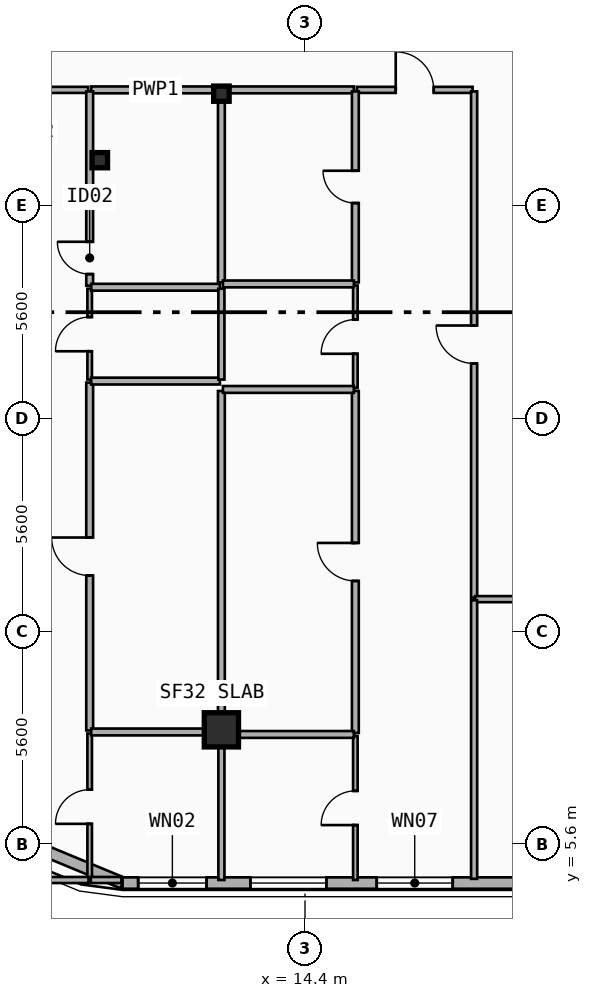
"""IFC4 building model, lengths in metres.
Left out: names, types, materials, properties, quantities, classifications, styles, units other than length and angle.
Written with IfcOpenShell. Run it as: python <this file> out.ifc"""

import sys

from ifc_helpers import new_model, si_unit, direction, frame, frame_2d, origin, origin_2d, place, context, subcontext, project, spatial, rectangle, i_section, extrude, element, fill, save


model = new_model("IFC4")
c1 = context("Model", 3, precision=1e-05, world=origin(), true_north=direction((0.0, 1.0)))
c2 = subcontext(c1, "Body", "Model", "MODEL_VIEW")
j1 = project(units=[si_unit("LENGTHUNIT", "METRE"), si_unit("PLANEANGLEUNIT", "RADIAN")], contexts=[c1])
p1 = place(None, origin())
s1 = spatial("IfcSite", under=j1, at=p1, CompositionType="ELEMENT")
p2 = place(p1, origin())
s2 = spatial("IfcBuilding", under=s1, at=p2, CompositionType="ELEMENT")
p3 = place(p2, frame((0.0, 0.0, 193.2)))
s3 = spatial("IfcBuildingStorey", under=s2, at=p3, CompositionType="ELEMENT", Elevation=193.2)
p4 = place(p3, frame((12.2, 25.35, 0.0), z_axis=(0.0, 0.0, 1.0), x_axis=(1.0, 0.0, 0.0)))
e1 = element("IfcColumn", 1, at=p4, inside=s3, PredefinedType="COLUMN", context=c2, shape_type="SweptSolid", body=[
    extrude(i_section(OverallWidth=0.408, OverallDepth=0.4, WebThickness=0.025, FlangeThickness=0.039, FilletRadius=0.015, at=origin_2d()), origin(), (0.0, 0.0, 1.0), 3.6),
])
p5 = place(p3, frame((12.2, 8.72, 0.0), z_axis=(0.0, -0.090231265542, 0.995920839584), x_axis=(1.0, 0.0, 0.0)))
e2 = element("IfcColumn", 2, at=p5, inside=s3, PredefinedType="COLUMN", context=c2, shape_type="SweptSolid", body=[
    extrude(rectangle(XDim=0.9, YDim=0.9, at=origin_2d()), origin(), (0.0, 0.0, 1.0), 3.615),
])
p6 = place(p3, frame((9.0, 23.6, 0.0), z_axis=(0.0, 0.0, 1.0), x_axis=(1.0, 0.0, 0.0)))
e3 = element("IfcColumn", 3, at=p6, inside=s3, PredefinedType="COLUMN", context=c2, shape_type="SweptSolid", body=[
    extrude(i_section(OverallWidth=0.408, OverallDepth=0.4, WebThickness=0.025, FlangeThickness=0.039, FilletRadius=0.015, at=origin_2d()), origin(), (0.0, 0.0, 1.0), 3.6),
])
p7 = place(p3, frame((9.6, 4.58, 0.0), z_axis=(0.0, 0.0, 1.0), x_axis=(-0.923910464346, 0.382608747773, 0.0)))
e4 = element("IfcWall", 4, at=p7, inside=s3, PredefinedType="SOLIDWALL", context=c2, shape_type="SweptSolid", body=[
    extrude(rectangle(XDim=3.077, YDim=0.3, at=frame_2d((1.539, 0.0))), origin(), (0.0, 0.0, 1.0), 3.34),
])
p8 = place(p3, frame((48.0, 4.58, 0.0), z_axis=(0.0, 0.0, 1.0), x_axis=(-1.0, 0.0, 0.0)))
e5 = element("IfcWall", 5, at=p8, inside=s3, PredefinedType="SOLIDWALL", context=c2, shape_type="SweptSolid", body=[
    extrude(rectangle(XDim=38.4, YDim=0.3, at=frame_2d((19.2, 0.0))), origin(), (0.0, 0.0, 1.0), 3.34),
])
p9 = place(p8, frame((36.19, 0.0, 0.8)))
e6 = element("IfcOpeningElement", 6, at=p9, cuts=e5, PredefinedType="OPENING", context=c2, shape_type="SweptSolid", body=[
    extrude(rectangle(XDim=1.8, YDim=1.8, at=frame_2d((0.9, 0.9))), frame((0.0, 0.16, 0.0), z_axis=(0.0, -1.0, 0.0), x_axis=(1.0, 0.0, 0.0)), (0.0, 0.0, 1.0), 0.32),
])
p10 = place(p8, frame((29.712, 0.0, 0.7)))
e7 = element("IfcOpeningElement", 7, at=p10, cuts=e5, PredefinedType="OPENING", context=c2, shape_type="SweptSolid", body=[
    extrude(rectangle(XDim=2.0, YDim=2.2, at=frame_2d((1.0, 1.1))), frame((0.0, 0.16, 0.0), z_axis=(0.0, -1.0, 0.0), x_axis=(1.0, 0.0, 0.0)), (0.0, 0.0, 1.0), 0.32),
])
p11 = place(p8, frame((33.038, 0.0, 0.7)))
e8 = element("IfcOpeningElement", 8, at=p11, cuts=e5, PredefinedType="OPENING", context=c2, shape_type="SweptSolid", body=[
    extrude(rectangle(XDim=2.0, YDim=2.2, at=frame_2d((1.0, 1.1))), frame((0.0, 0.16, 0.0), z_axis=(0.0, -1.0, 0.0), x_axis=(1.0, 0.0, 0.0)), (0.0, 0.0, 1.0), 0.32),
])
p12 = place(p8, frame((20.0, 0.0, 0.7)))
e9 = element("IfcOpeningElement", 9, at=p12, cuts=e5, PredefinedType="OPENING", context=c2, shape_type="SweptSolid", body=[
    extrude(rectangle(XDim=2.0, YDim=2.2, at=frame_2d((1.0, 1.1))), frame((0.0, 0.16, 0.0), z_axis=(0.0, -1.0, 0.0), x_axis=(1.0, 0.0, 0.0)), (0.0, 0.0, 1.0), 0.32),
])
p13 = place(p8, frame((25.2, 0.0, 0.7)))
e10 = element("IfcOpeningElement", 10, at=p13, cuts=e5, PredefinedType="OPENING", context=c2, shape_type="SweptSolid", body=[
    extrude(rectangle(XDim=2.0, YDim=2.2, at=frame_2d((1.0, 1.1))), frame((0.0, 0.16, 0.0), z_axis=(0.0, -1.0, 0.0), x_axis=(1.0, 0.0, 0.0)), (0.0, 0.0, 1.0), 0.32),
])
p14 = place(p8, frame((13.4, 0.0, 0.7)))
e11 = element("IfcOpeningElement", 11, at=p14, cuts=e5, PredefinedType="OPENING", context=c2, shape_type="SweptSolid", body=[
    extrude(rectangle(XDim=2.0, YDim=2.2, at=frame_2d((1.0, 1.1))), frame((0.0, 0.16, 0.0), z_axis=(0.0, -1.0, 0.0), x_axis=(1.0, 0.0, 0.0)), (0.0, 0.0, 1.0), 0.32),
])
p15 = place(p8, frame((6.993, 0.0, 0.7)))
e12 = element("IfcOpeningElement", 12, at=p15, cuts=e5, PredefinedType="OPENING", context=c2, shape_type="SweptSolid", body=[
    extrude(rectangle(XDim=2.0, YDim=2.2, at=frame_2d((1.0, 1.1))), frame((0.0, 0.16, 0.0), z_axis=(0.0, -1.0, 0.0), x_axis=(1.0, 0.0, 0.0)), (0.0, 0.0, 1.0), 0.32),
])
p16 = place(p8, frame((3.469, 0.0, 0.7)))
e13 = element("IfcOpeningElement", 13, at=p16, cuts=e5, PredefinedType="OPENING", context=c2, shape_type="SweptSolid", body=[
    extrude(rectangle(XDim=2.0, YDim=2.2, at=frame_2d((1.0, 1.1))), frame((0.0, 0.16, 0.0), z_axis=(0.0, -1.0, 0.0), x_axis=(1.0, 0.0, 0.0)), (0.0, 0.0, 1.0), 0.32),
])
p17 = place(p8, frame((0.41, 0.0, 0.8)))
e14 = element("IfcOpeningElement", 14, at=p17, cuts=e5, PredefinedType="OPENING", context=c2, shape_type="SweptSolid", body=[
    extrude(rectangle(XDim=1.8, YDim=1.8, at=frame_2d((0.9, 0.9))), frame((0.0, 0.16, 0.0), z_axis=(0.0, -1.0, 0.0), x_axis=(1.0, 0.0, 0.0)), (0.0, 0.0, 1.0), 0.32),
])
p18 = place(p3, frame((5.66, 25.45, 0.0), z_axis=(0.0, 0.0, 1.0), x_axis=(1.0, 0.0, 0.0)))
e15 = element("IfcWall", 15, at=p18, inside=s3, PredefinedType="PARTITIONING", context=c2, shape_type="SweptSolid", body=[
    extrude(rectangle(XDim=3.034, YDim=0.16, at=frame_2d((1.517, 0.0))), origin(), (0.0, 0.0, 1.0), 2.67),
])
p19 = place(p18, frame((1.017, 0.0, 0.0)))
e16 = element("IfcOpeningElement", 16, at=p19, cuts=e15, PredefinedType="OPENING", context=c2, shape_type="SweptSolid", body=[
    extrude(rectangle(XDim=1.0, YDim=2.15, at=frame_2d((0.5, 1.075))), frame((0.0, 0.09, 0.0), z_axis=(0.0, -1.0, 0.0), x_axis=(1.0, 0.0, 0.0)), (0.0, 0.0, 1.0), 0.18),
])
p20 = place(p3, frame((8.774, 25.45, 0.0), z_axis=(0.0, 0.0, 1.0), x_axis=(1.0, 0.0, 0.0)))
e17 = element("IfcWall", 17, at=p20, inside=s3, PredefinedType="PLUMBINGWALL", context=c2, shape_type="SweptSolid", body=[
    extrude(rectangle(XDim=3.386, YDim=0.18, at=frame_2d((1.693, 0.0))), origin(), (0.0, 0.0, 1.0), 2.42),
])
p21 = place(p3, frame((15.765, 25.45, 0.0), z_axis=(0.0, 0.0, 1.0), x_axis=(1.0, 0.0, 0.0)))
e18 = element("IfcWall", 18, at=p21, inside=s3, PredefinedType="PARTITIONING", context=c2, shape_type="SweptSolid", body=[
    extrude(rectangle(XDim=3.045, YDim=0.16, at=frame_2d((1.522, 0.0))), origin(), (0.0, 0.0, 1.0), 3.34),
])
p22 = place(p21, frame((1.022, 0.0, 0.0)))
e19 = element("IfcOpeningElement", 19, at=p22, cuts=e18, PredefinedType="OPENING", context=c2, shape_type="SweptSolid", body=[
    extrude(rectangle(XDim=1.0, YDim=2.15, at=frame_2d((0.5, 1.075))), frame((0.0, 0.09, 0.0), z_axis=(0.0, -1.0, 0.0), x_axis=(1.0, 0.0, 0.0)), (0.0, 0.0, 1.0), 0.18),
])
p23 = place(p3, frame((12.24, 25.45, 0.0), z_axis=(0.0, 0.0, 1.0), x_axis=(1.0, 0.0, 0.0)))
e20 = element("IfcWall", 20, at=p23, inside=s3, PredefinedType="PLUMBINGWALL", context=c2, shape_type="SweptSolid", body=[
    extrude(rectangle(XDim=3.445, YDim=0.18, at=frame_2d((1.723, 0.0))), origin(), (0.0, 0.0, 1.0), 2.42),
])
p24 = place(p3, frame((18.85, 12.09, 0.0), z_axis=(0.0, 0.0, 1.0), x_axis=(0.0, 1.0, 0.0)))
e21 = element("IfcWall", 21, at=p24, inside=s3, PredefinedType="PARTITIONING", context=c2, shape_type="SweptSolid", body=[
    extrude(rectangle(XDim=13.32, YDim=0.16, at=frame_2d((6.66, 0.0))), origin(), (0.0, 0.0, 1.0), 2.87),
])
p25 = place(p24, frame((6.16, 0.0, 0.0)))
e22 = element("IfcOpeningElement", 22, at=p25, cuts=e21, PredefinedType="OPENING", context=c2, shape_type="SweptSolid", body=[
    extrude(rectangle(XDim=1.0, YDim=2.15, at=frame_2d((0.5, 1.075))), frame((0.0, 0.09, 0.0), z_axis=(0.0, -1.0, 0.0), x_axis=(1.0, 0.0, 0.0)), (0.0, 0.0, 1.0), 0.18),
])
p26 = place(p3, frame((8.734, 4.66, 0.0), z_axis=(0.0, 0.0, 1.0), x_axis=(0.0, 1.0, 0.0)))
e23 = element("IfcWall", 23, at=p26, inside=s3, PredefinedType="PARTITIONING", context=c2, shape_type="SweptSolid", body=[
    extrude(rectangle(XDim=3.855, YDim=0.12, at=frame_2d((1.927, 0.0))), origin(), (0.0, 0.0, 1.0), 3.34),
])
p27 = place(p26, frame((1.478, 0.0, 0.0)))
e24 = element("IfcOpeningElement", 24, at=p27, cuts=e23, PredefinedType="OPENING", context=c2, shape_type="SweptSolid", body=[
    extrude(rectangle(XDim=0.9, YDim=2.1, at=frame_2d((0.45, 1.05))), frame((0.0, 0.07, 0.0), z_axis=(0.0, -1.0, 0.0), x_axis=(1.0, 0.0, 0.0)), (0.0, 0.0, 1.0), 0.14),
])
p28 = place(p3, frame((8.734, 8.595, 0.0), z_axis=(0.0, 0.0, 1.0), x_axis=(0.0, 1.0, 0.0)))
e25 = element("IfcWall", 25, at=p28, inside=s3, PredefinedType="PLUMBINGWALL", context=c2, shape_type="SweptSolid", body=[
    extrude(rectangle(XDim=9.153, YDim=0.18, at=frame_2d((4.577, 0.0))), origin(), (0.0, 0.0, 1.0), 2.82),
])
p29 = place(p28, frame((4.076, 0.0, 0.0)))
e26 = element("IfcOpeningElement", 26, at=p29, cuts=e25, PredefinedType="OPENING", context=c2, shape_type="SweptSolid", body=[
    extrude(rectangle(XDim=1.0, YDim=2.15, at=frame_2d((0.5, 1.075))), frame((0.0, 0.1, 0.0), z_axis=(0.0, -1.0, 0.0), x_axis=(1.0, 0.0, 0.0)), (0.0, 0.0, 1.0), 0.2),
])
p30 = place(p3, frame((8.734, 17.828, 0.0), z_axis=(0.0, 0.0, 1.0), x_axis=(0.0, 1.0, 0.0)))
e27 = element("IfcWall", 27, at=p30, inside=s3, PredefinedType="PARTITIONING", context=c2, shape_type="SweptSolid", body=[
    extrude(rectangle(XDim=2.389, YDim=0.12, at=frame_2d((1.195, 0.0))), origin(), (0.0, 0.0, 1.0), 2.82),
])
p31 = place(p30, frame((0.744, 0.0, 0.0)))
e28 = element("IfcOpeningElement", 28, at=p31, cuts=e27, PredefinedType="OPENING", context=c2, shape_type="SweptSolid", body=[
    extrude(rectangle(XDim=0.9, YDim=2.1, at=frame_2d((0.45, 1.05))), frame((0.0, 0.07, 0.0), z_axis=(0.0, -1.0, 0.0), x_axis=(1.0, 0.0, 0.0)), (0.0, 0.0, 1.0), 0.14),
])
p32 = place(p3, frame((8.734, 20.297, 0.0), z_axis=(0.0, 0.0, 1.0), x_axis=(0.0, 1.0, 0.0)))
e29 = element("IfcWall", 29, at=p32, inside=s3, PredefinedType="PLUMBINGWALL", context=c2, shape_type="SweptSolid", body=[
    extrude(rectangle(XDim=5.113, YDim=0.18, at=frame_2d((2.556, 0.0))), origin(), (0.0, 0.0, 1.0), 2.82),
])
p33 = place(p32, frame((0.306, 0.0, 0.0)))
e30 = element("IfcOpeningElement", 30, at=p33, cuts=e29, PredefinedType="OPENING", context=c2, shape_type="SweptSolid", body=[
    extrude(rectangle(XDim=0.85, YDim=2.1, at=frame_2d((0.425, 1.05))), frame((0.0, 0.1, 0.0), z_axis=(0.0, -1.0, 0.0), x_axis=(1.0, 0.0, 0.0)), (0.0, 0.0, 1.0), 0.2),
])
p34 = place(p3, frame((8.774, 8.555, 0.0), z_axis=(0.0, 0.0, 1.0), x_axis=(1.0, 0.0, 0.0)))
e31 = element("IfcWall", 31, at=p34, inside=s3, PredefinedType="PLUMBINGWALL", context=c2, shape_type="SweptSolid", body=[
    extrude(rectangle(XDim=3.386, YDim=0.18, at=frame_2d((1.693, 0.0))), origin(), (0.0, 0.0, 1.0), 2.42),
])
p35 = place(p3, frame((12.2, 4.66, 0.0), z_axis=(0.0, 0.0, 1.0), x_axis=(0.0, 1.0, 0.0)))
e32 = element("IfcWall", 32, at=p35, inside=s3, PredefinedType="PARTITIONING", context=c2, shape_type="SweptSolid", body=[
    extrude(rectangle(XDim=3.79, YDim=0.16, at=frame_2d((1.895, 0.0))), origin(), (0.0, 0.0, 1.0), 2.42),
])
p36 = place(p3, frame((8.774, 17.788, 0.0), z_axis=(0.0, 0.0, 1.0), x_axis=(1.0, 0.0, 0.0)))
e33 = element("IfcWall", 33, at=p36, inside=s3, PredefinedType="PLUMBINGWALL", context=c2, shape_type="SweptSolid", body=[
    extrude(rectangle(XDim=3.386, YDim=0.18, at=frame_2d((1.693, 0.0))), origin(), (0.0, 0.0, 1.0), 2.42),
])
p37 = place(p3, frame((12.2, 8.595, 0.0), z_axis=(0.0, 0.0, 1.0), x_axis=(0.0, 1.0, 0.0)))
e34 = element("IfcWall", 34, at=p37, inside=s3, PredefinedType="PLUMBINGWALL", context=c2, shape_type="SweptSolid", body=[
    extrude(rectangle(XDim=8.933, YDim=0.18, at=frame_2d((4.467, 0.0))), origin(), (0.0, 0.0, 1.0), 2.42),
])
p38 = place(p3, frame((8.774, 20.257, 0.0), z_axis=(0.0, 0.0, 1.0), x_axis=(1.0, 0.0, 0.0)))
e35 = element("IfcWall", 35, at=p38, inside=s3, PredefinedType="PLUMBINGWALL", context=c2, shape_type="SweptSolid", body=[
    extrude(rectangle(XDim=3.386, YDim=0.18, at=frame_2d((1.693, 0.0))), origin(), (0.0, 0.0, 1.0), 2.42),
])
p39 = place(p3, frame((12.2, 17.828, 0.0), z_axis=(0.0, 0.0, 1.0), x_axis=(0.0, 1.0, 0.0)))
e36 = element("IfcWall", 36, at=p39, inside=s3, PredefinedType="PARTITIONING", context=c2, shape_type="SweptSolid", body=[
    extrude(rectangle(XDim=2.389, YDim=0.16, at=frame_2d((1.195, 0.0))), origin(), (0.0, 0.0, 1.0), 2.42),
])
p40 = place(p3, frame((12.2, 20.384, 0.0), z_axis=(0.0, 0.0, 1.0), x_axis=(0.0, 1.0, 0.0)))
e37 = element("IfcWall", 37, at=p40, inside=s3, PredefinedType="PLUMBINGWALL", context=c2, shape_type="SweptSolid", body=[
    extrude(rectangle(XDim=5.026, YDim=0.18, at=frame_2d((2.513, 0.0))), origin(), (0.0, 0.0, 1.0), 2.42),
])
p41 = place(p3, frame((15.725, 4.66, 0.0), z_axis=(0.0, 0.0, 1.0), x_axis=(0.0, 1.0, 0.0)))
e38 = element("IfcWall", 38, at=p41, inside=s3, PredefinedType="PARTITIONING", context=c2, shape_type="SweptSolid", body=[
    extrude(rectangle(XDim=3.79, YDim=0.12, at=frame_2d((1.895, 0.0))), origin(), (0.0, 0.0, 1.0), 3.0),
])
p42 = place(p41, frame((1.445, 0.0, 0.0)))
e39 = element("IfcOpeningElement", 39, at=p42, cuts=e38, PredefinedType="OPENING", context=c2, shape_type="SweptSolid", body=[
    extrude(rectangle(XDim=0.9, YDim=2.1, at=frame_2d((0.45, 1.05))), frame((0.0, 0.07, 0.0), z_axis=(0.0, -1.0, 0.0), x_axis=(1.0, 0.0, 0.0)), (0.0, 0.0, 1.0), 0.14),
])
p43 = place(p3, frame((15.725, 8.53, 0.0), z_axis=(0.0, 0.0, 1.0), x_axis=(0.0, 1.0, 0.0)))
e40 = element("IfcWall", 40, at=p43, inside=s3, PredefinedType="PLUMBINGWALL", context=c2, shape_type="SweptSolid", body=[
    extrude(rectangle(XDim=8.998, YDim=0.18, at=frame_2d((4.499, 0.0))), origin(), (0.0, 0.0, 1.0), 2.87),
])
p44 = place(p43, frame((3.999, 0.0, 0.0)))
e41 = element("IfcOpeningElement", 41, at=p44, cuts=e40, PredefinedType="OPENING", context=c2, shape_type="SweptSolid", body=[
    extrude(rectangle(XDim=1.0, YDim=2.15, at=frame_2d((0.5, 1.075))), frame((0.0, 0.1, 0.0), z_axis=(0.0, -1.0, 0.0), x_axis=(1.0, 0.0, 0.0)), (0.0, 0.0, 1.0), 0.2),
])
p45 = place(p3, frame((15.725, 17.608, 0.0), z_axis=(0.0, 0.0, 1.0), x_axis=(0.0, 1.0, 0.0)))
e42 = element("IfcWall", 42, at=p45, inside=s3, PredefinedType="PARTITIONING", context=c2, shape_type="SweptSolid", body=[
    extrude(rectangle(XDim=2.696, YDim=0.12, at=frame_2d((1.348, 0.0))), origin(), (0.0, 0.0, 1.0), 2.87),
])
p46 = place(p45, frame((0.898, 0.0, 0.0)))
e43 = element("IfcOpeningElement", 43, at=p46, cuts=e42, PredefinedType="OPENING", context=c2, shape_type="SweptSolid", body=[
    extrude(rectangle(XDim=0.9, YDim=2.1, at=frame_2d((0.45, 1.05))), frame((0.0, 0.07, 0.0), z_axis=(0.0, -1.0, 0.0), x_axis=(1.0, 0.0, 0.0)), (0.0, 0.0, 1.0), 0.14),
])
p47 = place(p3, frame((15.725, 20.384, 0.0), z_axis=(0.0, 0.0, 1.0), x_axis=(0.0, 1.0, 0.0)))
e44 = element("IfcWall", 44, at=p47, inside=s3, PredefinedType="PLUMBINGWALL", context=c2, shape_type="SweptSolid", body=[
    extrude(rectangle(XDim=5.026, YDim=0.18, at=frame_2d((2.513, 0.0))), origin(), (0.0, 0.0, 1.0), 2.88),
])
p48 = place(p47, frame((2.088, 0.0, 0.0)))
e45 = element("IfcOpeningElement", 45, at=p48, cuts=e44, PredefinedType="OPENING", context=c2, shape_type="SweptSolid", body=[
    extrude(rectangle(XDim=0.85, YDim=2.1, at=frame_2d((0.425, 1.05))), frame((0.0, 0.1, 0.0), z_axis=(0.0, -1.0, 0.0), x_axis=(1.0, 0.0, 0.0)), (0.0, 0.0, 1.0), 0.2),
])
for number, where, z_axis, x_axis in (
    (46, (12.24, 8.49, 0.0), (0.0, 0.0, 1.0), (1.0, 0.0, 0.0)),
    (47, (12.24, 17.568, 0.0), (0.0, 0.0, 1.0), (1.0, 0.0, 0.0)),
    (48, (12.24, 20.344, 0.0), (0.0, 0.0, 1.0), (1.0, 0.0, 0.0)),
):
    element("IfcWall", number, at=place(p3, frame(where, z_axis=z_axis, x_axis=x_axis)), inside=s3, PredefinedType="PLUMBINGWALL", context=c2, shape_type="SweptSolid", body=[
        extrude(rectangle(XDim=3.445, YDim=0.18, at=frame_2d((1.723, 0.0))), origin(), (0.0, 0.0, 1.0), 2.42),
    ])
p49 = place(p3, frame((18.88, 12.05, 0.0), z_axis=(0.0, 0.0, 1.0), x_axis=(1.0, 0.0, 0.0)))
e49 = element("IfcWall", 49, at=p49, inside=s3, PredefinedType="PARTITIONING", context=c2, shape_type="SweptSolid", body=[
    extrude(rectangle(XDim=1.54, YDim=0.16, at=frame_2d((0.77, 0.0))), origin(), (0.0, 0.0, 1.0), 2.87),
])
p50 = place(p3, frame((5.69, 4.66, 0.0), z_axis=(0.0, 0.0, 1.0), x_axis=(1.0, 0.0, 0.0)))
e50 = element("IfcWall", 50, at=p50, inside=s3, PredefinedType="PARTITIONING", context=c2, shape_type="SweptSolid", body=[
    extrude(rectangle(XDim=3.014, YDim=0.16, at=frame_2d((1.507, 0.0))), origin(), (0.0, 0.0, 1.0), 3.34),
])
p51 = place(p3, frame((8.764, 4.66, 0.0), z_axis=(0.0, 0.0, 1.0), x_axis=(1.0, 0.0, 0.0)))
e51 = element("IfcWall", 51, at=p51, inside=s3, PredefinedType="PARTITIONING", context=c2, shape_type="SweptSolid", body=[
    extrude(rectangle(XDim=0.806, YDim=0.16, at=frame_2d((0.403, 0.0))), origin(), (0.0, 0.0, 1.0), 3.34),
])
p52 = place(p3, frame((18.85, 4.69, 0.0), z_axis=(0.0, 0.0, 1.0), x_axis=(0.0, 1.0, 0.0)))
e52 = element("IfcWall", 52, at=p52, inside=s3, PredefinedType="PARTITIONING", context=c2, shape_type="SweptSolid", body=[
    extrude(rectangle(XDim=7.33, YDim=0.16, at=frame_2d((3.665, 0.0))), origin(), (0.0, 0.0, 1.0), 2.87),
])
p53 = place(p9, origin())
e53 = element("IfcWindow", 53, at=p53, inside=s3, PartitioningType="SINGLE_PANEL", PredefinedType="WINDOW", context=c2, shape_type="SweptSolid", body=[
    extrude(rectangle(XDim=1.8, YDim=1.8, at=frame_2d((0.9, 0.9))), frame((0.0, 0.03, 0.0), z_axis=(0.0, -1.0, 0.0), x_axis=(1.0, 0.0, 0.0)), (0.0, 0.0, 1.0), 0.06),
])
fill(e6, e53)
p54 = place(p10, origin())
e54 = element("IfcWindow", 54, at=p54, inside=s3, PartitioningType="SINGLE_PANEL", PredefinedType="WINDOW", context=c2, shape_type="SweptSolid", body=[
    extrude(rectangle(XDim=2.0, YDim=2.2, at=frame_2d((1.0, 1.1))), frame((0.0, 0.03, 0.0), z_axis=(0.0, -1.0, 0.0), x_axis=(1.0, 0.0, 0.0)), (0.0, 0.0, 1.0), 0.06),
])
fill(e7, e54)
p55 = place(p11, origin())
e55 = element("IfcWindow", 55, at=p55, inside=s3, PartitioningType="SINGLE_PANEL", PredefinedType="WINDOW", context=c2, shape_type="SweptSolid", body=[
    extrude(rectangle(XDim=2.0, YDim=2.2, at=frame_2d((1.0, 1.1))), frame((0.0, 0.03, 0.0), z_axis=(0.0, -1.0, 0.0), x_axis=(1.0, 0.0, 0.0)), (0.0, 0.0, 1.0), 0.06),
])
fill(e8, e55)
p56 = place(p22, origin())
e56 = element("IfcDoor", 56, at=p56, inside=s3, OperationType="SINGLE_SWING_LEFT", PredefinedType="DOOR", context=c2, shape_type="SweptSolid", body=[
    extrude(rectangle(XDim=1.0, YDim=2.15, at=frame_2d((0.5, 1.075))), frame((0.0, 0.025, 0.0), z_axis=(0.0, -1.0, 0.0), x_axis=(1.0, 0.0, 0.0)), (0.0, 0.0, 1.0), 0.05),
])
fill(e19, e56)
p57 = place(p25, origin())
e57 = element("IfcDoor", 57, at=p57, inside=s3, OperationType="SINGLE_SWING_RIGHT", PredefinedType="DOOR", context=c2, shape_type="SweptSolid", body=[
    extrude(rectangle(XDim=1.0, YDim=2.15, at=frame_2d((0.5, 1.075))), frame((0.0, 0.025, 0.0), z_axis=(0.0, -1.0, 0.0), x_axis=(1.0, 0.0, 0.0)), (0.0, 0.0, 1.0), 0.05),
])
fill(e22, e57)
p58 = place(p27, origin())
e58 = element("IfcDoor", 58, at=p58, inside=s3, OperationType="SINGLE_SWING_LEFT", PredefinedType="DOOR", context=c2, shape_type="SweptSolid", body=[
    extrude(rectangle(XDim=0.9, YDim=2.1, at=frame_2d((0.45, 1.05))), frame((0.0, 0.025, 0.0), z_axis=(0.0, -1.0, 0.0), x_axis=(1.0, 0.0, 0.0)), (0.0, 0.0, 1.0), 0.05),
])
fill(e24, e58)
p59 = place(p29, origin())
e59 = element("IfcDoor", 59, at=p59, inside=s3, OperationType="SINGLE_SWING_RIGHT", PredefinedType="DOOR", context=c2, shape_type="SweptSolid", body=[
    extrude(rectangle(XDim=1.0, YDim=2.15, at=frame_2d((0.5, 1.075))), frame((0.0, 0.025, 0.0), z_axis=(0.0, -1.0, 0.0), x_axis=(1.0, 0.0, 0.0)), (0.0, 0.0, 1.0), 0.05),
])
fill(e26, e59)
p60 = place(p31, origin())
e60 = element("IfcDoor", 60, at=p60, inside=s3, OperationType="SINGLE_SWING_LEFT", PredefinedType="DOOR", context=c2, shape_type="SweptSolid", body=[
    extrude(rectangle(XDim=0.9, YDim=2.1, at=frame_2d((0.45, 1.05))), frame((0.0, 0.025, 0.0), z_axis=(0.0, -1.0, 0.0), x_axis=(1.0, 0.0, 0.0)), (0.0, 0.0, 1.0), 0.05),
])
fill(e28, e60)
p61 = place(p33, origin())
e61 = element("IfcDoor", 61, at=p61, inside=s3, OperationType="SINGLE_SWING_RIGHT", PredefinedType="DOOR", context=c2, shape_type="SweptSolid", body=[
    extrude(rectangle(XDim=0.85, YDim=2.1, at=frame_2d((0.425, 1.05))), frame((0.0, 0.025, 0.0), z_axis=(0.0, -1.0, 0.0), x_axis=(1.0, 0.0, 0.0)), (0.0, 0.0, 1.0), 0.05),
])
fill(e30, e61)
p62 = place(p42, origin())
e62 = element("IfcDoor", 62, at=p62, inside=s3, OperationType="SINGLE_SWING_LEFT", PredefinedType="DOOR", context=c2, shape_type="SweptSolid", body=[
    extrude(rectangle(XDim=0.9, YDim=2.1, at=frame_2d((0.45, 1.05))), frame((0.0, 0.025, 0.0), z_axis=(0.0, -1.0, 0.0), x_axis=(1.0, 0.0, 0.0)), (0.0, 0.0, 1.0), 0.05),
])
fill(e39, e62)
p63 = place(p44, origin())
e63 = element("IfcDoor", 63, at=p63, inside=s3, OperationType="SINGLE_SWING_RIGHT", PredefinedType="DOOR", context=c2, shape_type="SweptSolid", body=[
    extrude(rectangle(XDim=1.0, YDim=2.15, at=frame_2d((0.5, 1.075))), frame((0.0, 0.025, 0.0), z_axis=(0.0, -1.0, 0.0), x_axis=(1.0, 0.0, 0.0)), (0.0, 0.0, 1.0), 0.05),
])
fill(e41, e63)
p64 = place(p46, origin())
e64 = element("IfcDoor", 64, at=p64, inside=s3, OperationType="SINGLE_SWING_LEFT", PredefinedType="DOOR", context=c2, shape_type="SweptSolid", body=[
    extrude(rectangle(XDim=0.9, YDim=2.1, at=frame_2d((0.45, 1.05))), frame((0.0, 0.025, 0.0), z_axis=(0.0, -1.0, 0.0), x_axis=(1.0, 0.0, 0.0)), (0.0, 0.0, 1.0), 0.05),
])
fill(e43, e64)
p65 = place(p48, origin())
e65 = element("IfcDoor", 65, at=p65, inside=s3, OperationType="SINGLE_SWING_RIGHT", PredefinedType="DOOR", context=c2, shape_type="SweptSolid", body=[
    extrude(rectangle(XDim=0.85, YDim=2.1, at=frame_2d((0.425, 1.05))), frame((0.0, 0.025, 0.0), z_axis=(0.0, -1.0, 0.0), x_axis=(1.0, 0.0, 0.0)), (0.0, 0.0, 1.0), 0.05),
])
fill(e45, e65)
save(model, sys.argv[1])
